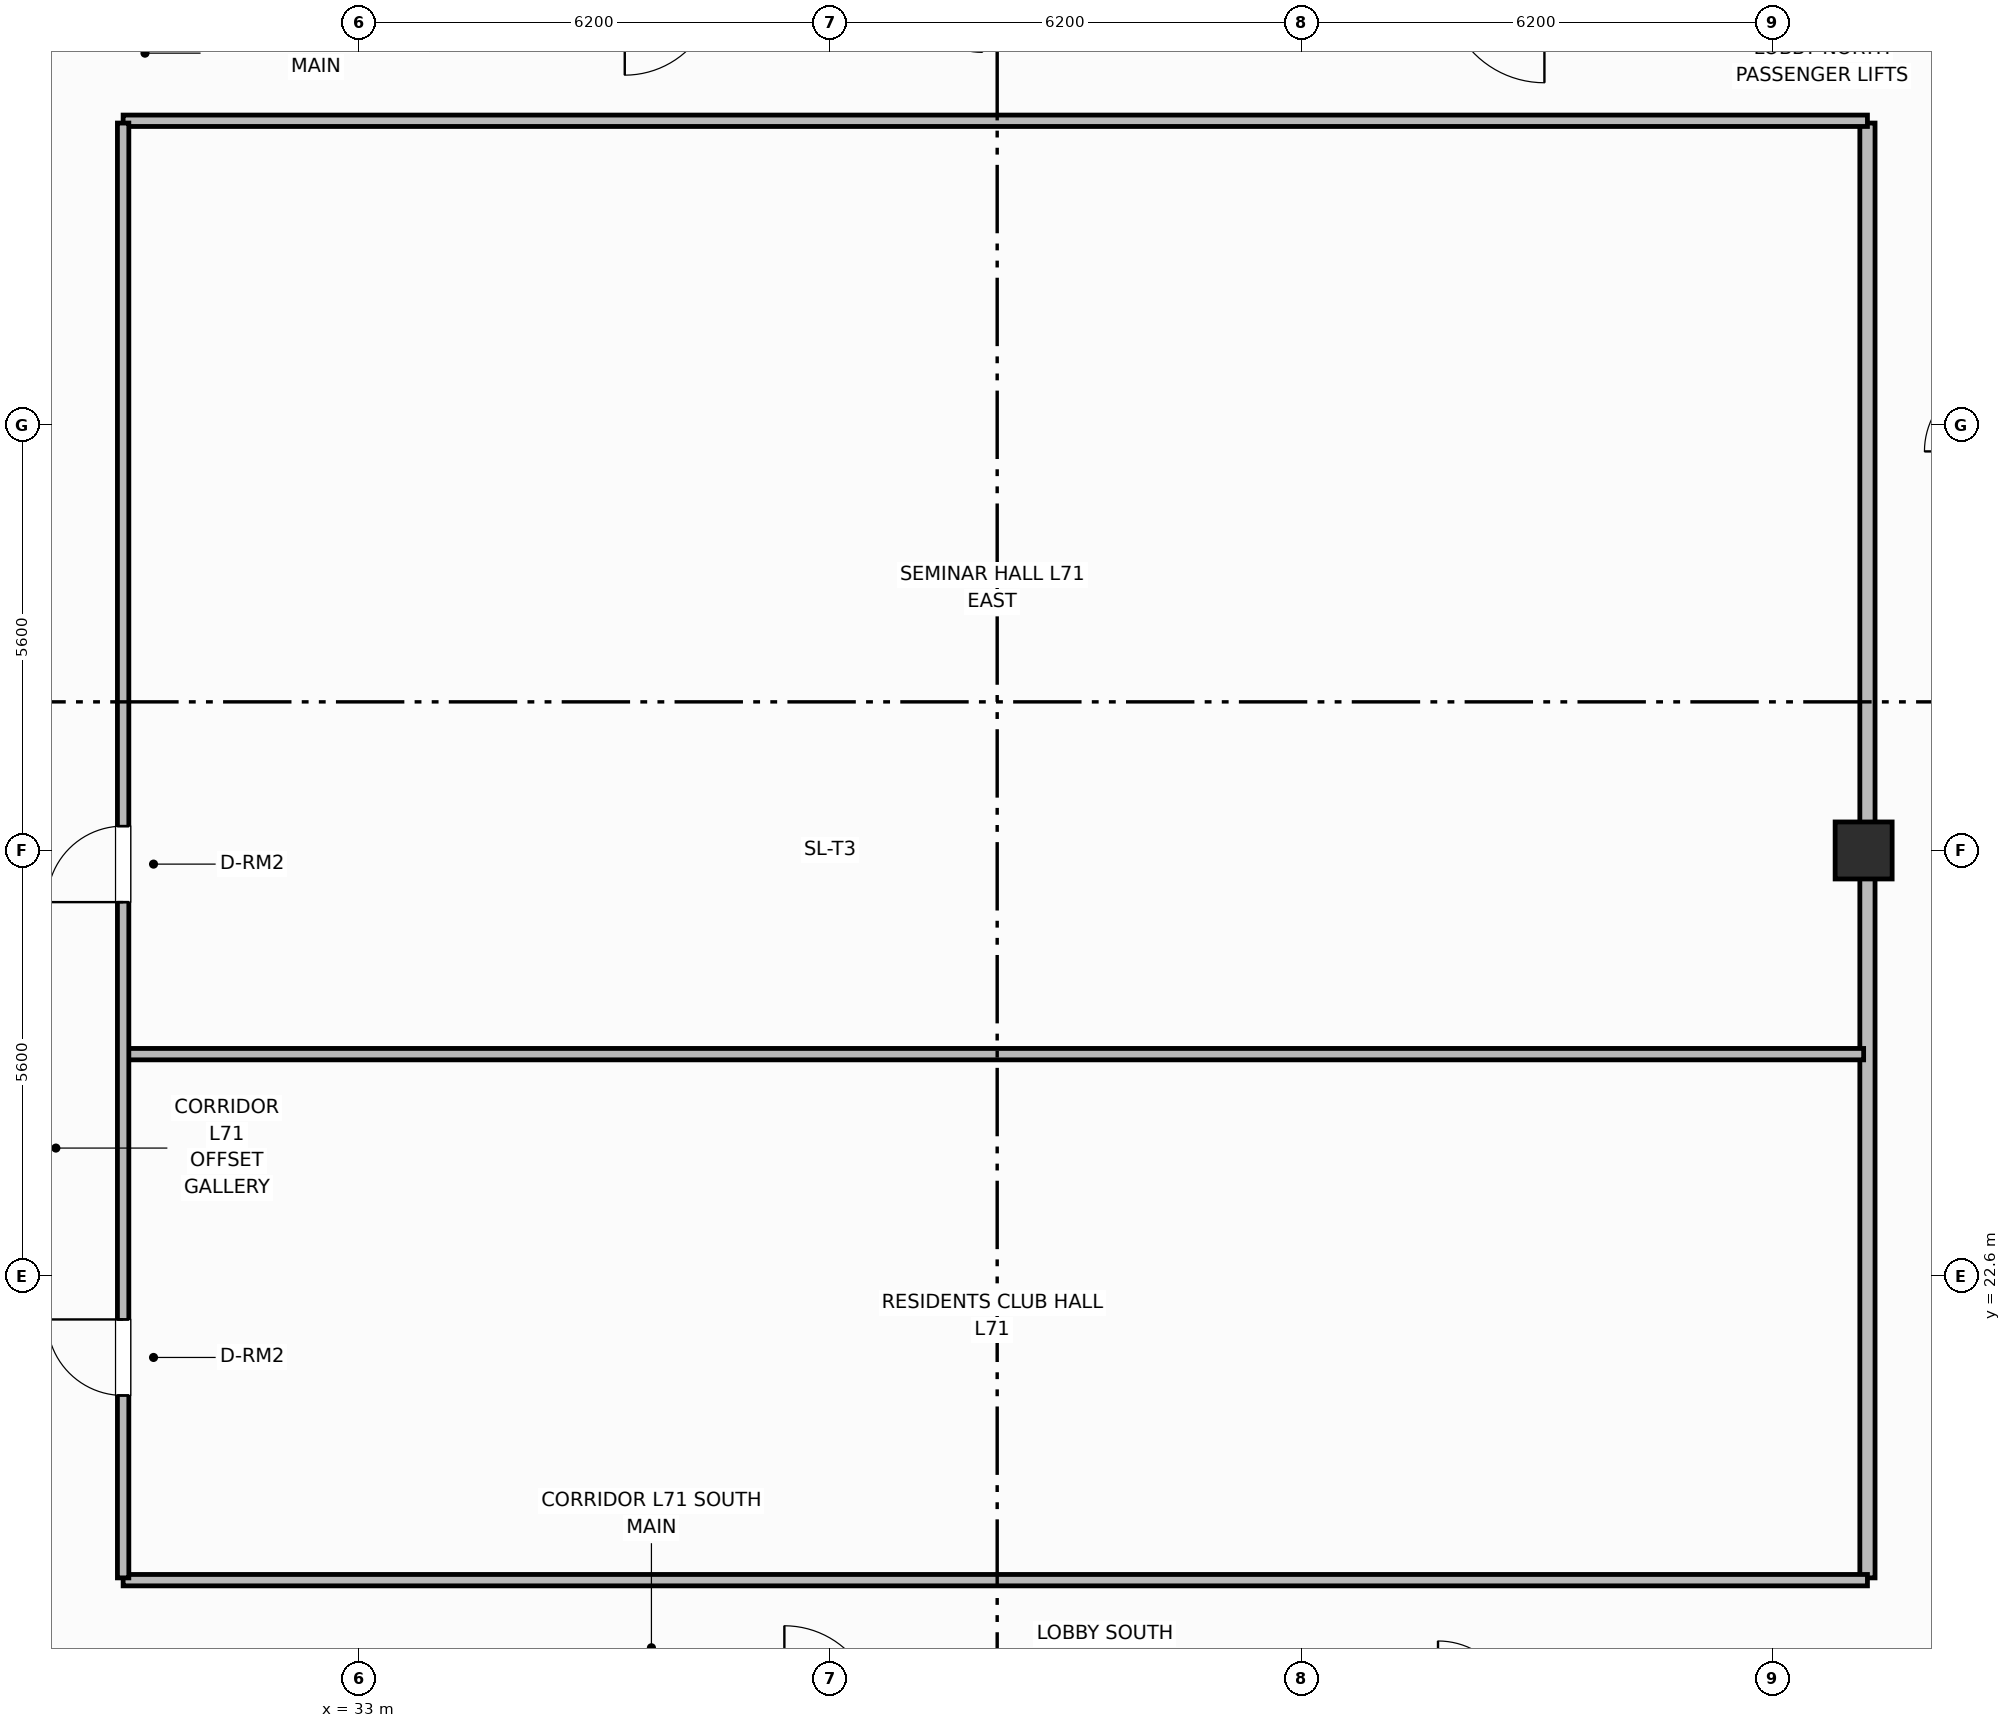
"""IFC4 building model, lengths in metres.
Left out: names, types, materials, properties, quantities, classifications, styles, units other than length and angle.
Written with IfcOpenShell. Run it as: python <this file> out.ifc"""

import sys

from ifc_helpers import new_model, si_unit, direction, frame, frame_2d, origin, origin_2d, place, context, subcontext, project, spatial, rectangle, extrude, element, fill, save


model = new_model("IFC4")
c1 = context("Model", 3, precision=1e-05, world=origin(), true_north=direction((0.0, 1.0)))
c2 = subcontext(c1, "Body", "Model", "MODEL_VIEW")
j1 = project(units=[si_unit("LENGTHUNIT", "METRE"), si_unit("PLANEANGLEUNIT", "RADIAN")], contexts=[c1])
p1 = place(None, origin())
s1 = spatial("IfcSite", under=j1, at=p1, CompositionType="ELEMENT")
p2 = place(p1, origin())
s2 = spatial("IfcBuilding", under=s1, at=p2, CompositionType="ELEMENT")
p3 = place(p2, frame((0.0, 0.0, 282.4)))
s3 = spatial("IfcBuildingStorey", under=s2, at=p3, CompositionType="ELEMENT", Elevation=282.4)
p4 = place(p3, frame((52.8, 28.2, 0.0), z_axis=(0.0, 0.0, 1.0), x_axis=(1.0, 0.0, 0.0)))
e1 = element("IfcColumn", 1, at=p4, inside=s3, PredefinedType="COLUMN", context=c2, shape_type="SweptSolid", body=[
    extrude(rectangle(XDim=0.75, YDim=0.75, at=origin_2d()), origin(), (0.0, 0.0, 1.0), 3.7),
])
p5 = place(p3, frame((52.85, 18.63, 0.0), z_axis=(0.0, 0.0, 1.0), x_axis=(0.0, 1.0, 0.0)))
e2 = element("IfcWall", 2, at=p5, inside=s3, PredefinedType="PARTITIONING", context=c2, shape_type="SweptSolid", body=[
    extrude(rectangle(XDim=19.14, YDim=0.2, at=frame_2d((9.57, 0.0))), origin(), (0.0, 0.0, 1.0), 2.56),
])
for number, where, z_axis, x_axis in (
    (3, (29.9, 18.6, 0.0), (0.0, 0.0, 1.0), (1.0, 0.0, 0.0)),
    (4, (29.9, 37.8, 0.0), (0.0, 0.0, 1.0), (1.0, 0.0, 0.0)),
):
    element("IfcWall", number, at=place(p3, frame(where, z_axis=z_axis, x_axis=x_axis)), inside=s3, PredefinedType="PARTITIONING", context=c2, shape_type="SweptSolid", body=[
        extrude(rectangle(XDim=22.95, YDim=0.15, at=frame_2d((11.475, 0.0))), origin(), (0.0, 0.0, 1.0), 2.56),
    ])
p6 = place(p3, frame((29.93, 25.521, 0.0), z_axis=(0.0, 0.0, 1.0), x_axis=(1.0, 0.0, 0.0)))
e5 = element("IfcWall", 5, at=p6, inside=s3, PredefinedType="PARTITIONING", context=c2, shape_type="SweptSolid", body=[
    extrude(rectangle(XDim=22.87, YDim=0.15, at=frame_2d((11.435, 0.0))), origin(), (0.0, 0.0, 1.0), 2.56),
])
p7 = place(p3, frame((29.9, 18.63, 0.0), z_axis=(0.0, 0.0, 1.0), x_axis=(0.0, 1.0, 0.0)))
e6 = element("IfcWall", 6, at=p7, inside=s3, PredefinedType="PARTITIONING", context=c2, shape_type="SweptSolid", body=[
    extrude(rectangle(XDim=19.14, YDim=0.15, at=frame_2d((9.57, 0.0))), origin(), (0.0, 0.0, 1.0), 2.56),
])
p8 = place(p7, frame((2.4, 0.0, 0.0)))
e7 = element("IfcOpeningElement", 7, at=p8, cuts=e6, PredefinedType="OPENING", context=c2, shape_type="SweptSolid", body=[
    extrude(rectangle(XDim=1.0, YDim=2.15, at=frame_2d((0.5, 1.075))), frame((0.0, 0.085, 0.0), z_axis=(0.0, -1.0, 0.0), x_axis=(1.0, 0.0, 0.0)), (0.0, 0.0, 1.0), 0.17),
])
p9 = place(p7, frame((8.89, 0.0, 0.0)))
e8 = element("IfcOpeningElement", 8, at=p9, cuts=e6, PredefinedType="OPENING", context=c2, shape_type="SweptSolid", body=[
    extrude(rectangle(XDim=1.0, YDim=2.15, at=frame_2d((0.5, 1.075))), frame((0.0, 0.085, 0.0), z_axis=(0.0, -1.0, 0.0), x_axis=(1.0, 0.0, 0.0)), (0.0, 0.0, 1.0), 0.17),
])
p10 = place(p8, origin())
e9 = element("IfcDoor", 9, at=p10, inside=s3, OperationType="SINGLE_SWING_RIGHT", PredefinedType="DOOR", context=c2, shape_type="SweptSolid", body=[
    extrude(rectangle(XDim=1.0, YDim=2.15, at=frame_2d((0.5, 1.075))), frame((0.0, 0.025, 0.0), z_axis=(0.0, -1.0, 0.0), x_axis=(1.0, 0.0, 0.0)), (0.0, 0.0, 1.0), 0.05),
])
fill(e7, e9)
p11 = place(p9, origin())
e10 = element("IfcDoor", 10, at=p11, inside=s3, OperationType="SINGLE_SWING_LEFT", PredefinedType="DOOR", context=c2, shape_type="SweptSolid", body=[
    extrude(rectangle(XDim=1.0, YDim=2.15, at=frame_2d((0.5, 1.075))), frame((0.0, 0.025, 0.0), z_axis=(0.0, -1.0, 0.0), x_axis=(1.0, 0.0, 0.0)), (0.0, 0.0, 1.0), 0.05),
])
fill(e8, e10)
save(model, sys.argv[1])
